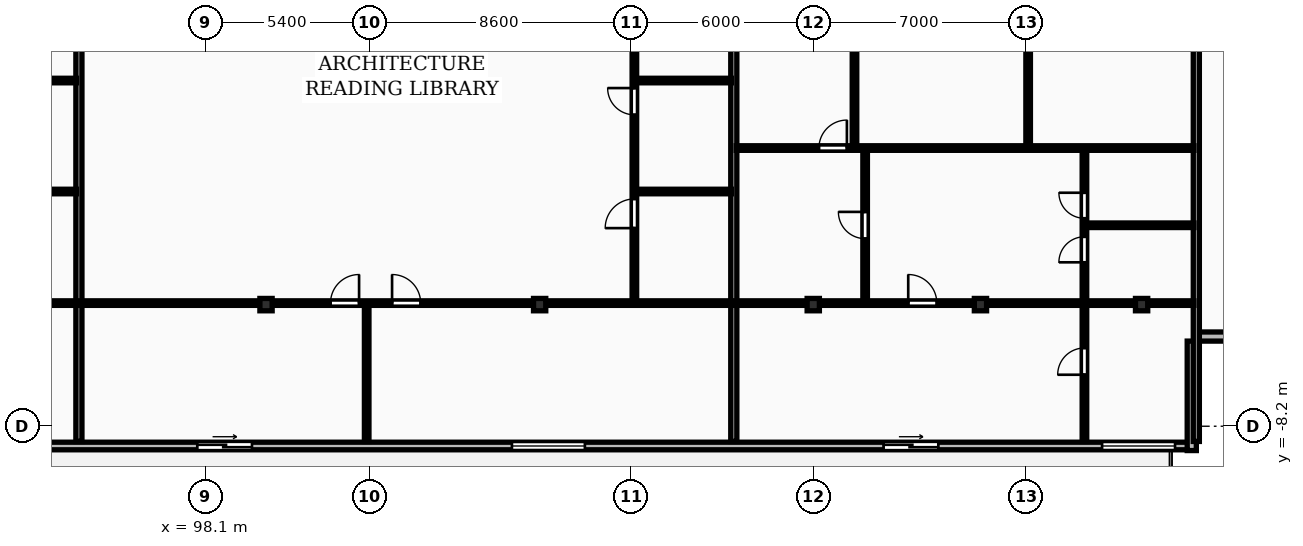
"""IFC4 building model, lengths in metres.
Left out: names, types, materials, properties, quantities, classifications, styles, units other than length and angle.
Written with IfcOpenShell. Run it as: python <this file> out.ifc"""

import sys

from ifc_helpers import new_model, si_unit, direction, frame, frame_2d, origin, origin_2d, place, context, subcontext, project, spatial, rectangle, i_section, extrude, element, fill, save


model = new_model("IFC4")
c1 = context("Model", 3, precision=1e-05, world=origin(), true_north=direction((0.0, 1.0)))
c2 = subcontext(c1, "Body", "Model", "MODEL_VIEW")
j1 = project(units=[si_unit("LENGTHUNIT", "METRE"), si_unit("PLANEANGLEUNIT", "RADIAN")], contexts=[c1])
p1 = place(None, origin())
s1 = spatial("IfcSite", under=j1, at=p1, CompositionType="ELEMENT")
p2 = place(p1, origin())
s2 = spatial("IfcBuilding", under=s1, at=p2, CompositionType="ELEMENT")
p3 = place(p2, frame((0.0, 0.0, 150.1)))
s3 = spatial("IfcBuildingStorey", under=s2, at=p3, CompositionType="ELEMENT", Elevation=150.1)
for number, where, z_axis, x_axis in (
    (1, (100.1, -4.2, 0.0), (0.0, 0.0, 1.0), (1.0, 0.0, 0.0)),
    (2, (109.1, -4.2, 0.0), (0.0, 0.0, 1.0), (1.0, 0.0, 0.0)),
    (3, (118.1, -4.2, 0.0), (0.0, 0.0, 1.0), (1.0, 0.0, 0.0)),
    (4, (123.6, -4.2, 0.0), (0.0, 0.0, 1.0), (1.0, 0.0, 0.0)),
    (5, (128.9, -4.2, 0.0), (0.0, 0.0, 1.0), (1.0, 0.0, 0.0)),
):
    element("IfcColumn", number, at=place(p3, frame(where, z_axis=z_axis, x_axis=x_axis)), inside=s3, PredefinedType="COLUMN", context=c2, shape_type="SweptSolid", body=[
        extrude(i_section(OverallWidth=0.403, OverallDepth=0.406, WebThickness=0.027, FlangeThickness=0.043, FilletRadius=0.015, at=origin_2d()), origin(), (0.0, 0.0, 1.0), 3.6),
    ])
p4 = place(p3, frame((72.7, -8.85, 0.0), z_axis=(0.0, 0.0, 1.0), x_axis=(1.0, 0.0, 0.0)))
e6 = element("IfcWall", 6, at=p4, inside=s3, PredefinedType="STANDARD", context=c2, shape_type="SweptSolid", body=[
    extrude(rectangle(XDim=58.0, YDim=0.25, at=frame_2d((29.0, 0.0))), origin(), (0.0, 0.0, 1.0), 3.31),
])
p5 = place(p4, frame((3.761, 0.0, 0.0)))
e7 = element("IfcOpeningElement", 7, at=p5, cuts=e6, PredefinedType="OPENING", context=c2, shape_type="SweptSolid", body=[
    extrude(rectangle(XDim=1.8, YDim=2.2, at=frame_2d((0.9, 1.1))), frame((0.0, 0.135, 0.0), z_axis=(0.0, -1.0, 0.0), x_axis=(1.0, 0.0, 0.0)), (0.0, 0.0, 1.0), 0.27),
])
p6 = place(p4, frame((13.964, 0.0, 0.85)))
e8 = element("IfcOpeningElement", 8, at=p6, cuts=e6, PredefinedType="OPENING", context=c2, shape_type="SweptSolid", body=[
    extrude(rectangle(XDim=2.4, YDim=1.9, at=frame_2d((1.2, 0.95))), frame((0.0, 0.135, 0.0), z_axis=(0.0, -1.0, 0.0), x_axis=(1.0, 0.0, 0.0)), (0.0, 0.0, 1.0), 0.27),
])
p7 = place(p4, frame((25.138, 0.0, 0.0)))
e9 = element("IfcOpeningElement", 9, at=p7, cuts=e6, PredefinedType="OPENING", context=c2, shape_type="SweptSolid", body=[
    extrude(rectangle(XDim=1.8, YDim=2.2, at=frame_2d((0.9, 1.1))), frame((0.0, 0.135, 0.0), z_axis=(0.0, -1.0, 0.0), x_axis=(1.0, 0.0, 0.0)), (0.0, 0.0, 1.0), 0.27),
])
p8 = place(p4, frame((35.489, 0.0, 0.85)))
e10 = element("IfcOpeningElement", 10, at=p8, cuts=e6, PredefinedType="OPENING", context=c2, shape_type="SweptSolid", body=[
    extrude(rectangle(XDim=2.4, YDim=1.9, at=frame_2d((1.2, 0.95))), frame((0.0, 0.135, 0.0), z_axis=(0.0, -1.0, 0.0), x_axis=(1.0, 0.0, 0.0)), (0.0, 0.0, 1.0), 0.27),
])
p9 = place(p4, frame((47.713, 0.0, 0.0)))
e11 = element("IfcOpeningElement", 11, at=p9, cuts=e6, PredefinedType="OPENING", context=c2, shape_type="SweptSolid", body=[
    extrude(rectangle(XDim=1.8, YDim=2.2, at=frame_2d((0.9, 1.1))), frame((0.0, 0.135, 0.0), z_axis=(0.0, -1.0, 0.0), x_axis=(1.0, 0.0, 0.0)), (0.0, 0.0, 1.0), 0.27),
])
p10 = place(p4, frame((54.9, 0.0, 0.85)))
e12 = element("IfcOpeningElement", 12, at=p10, cuts=e6, PredefinedType="OPENING", context=c2, shape_type="SweptSolid", body=[
    extrude(rectangle(XDim=2.4, YDim=1.9, at=frame_2d((1.2, 0.95))), frame((0.0, 0.135, 0.0), z_axis=(0.0, -1.0, 0.0), x_axis=(1.0, 0.0, 0.0)), (0.0, 0.0, 1.0), 0.27),
])
for number, where, z_axis, x_axis in (
    (13, (130.55, -9.0, 0.0), (0.0, 0.0, 1.0), (0.0, 1.0, 0.0)),
    (14, (130.7, -5.25, 0.0), (0.0, 0.0, 1.0), (1.0, 0.0, 0.0)),
):
    element("IfcWall", number, at=place(p3, frame(where, z_axis=z_axis, x_axis=x_axis)), inside=s3, PredefinedType="STANDARD", context=c2, shape_type="SweptSolid", body=[
        extrude(rectangle(XDim=3.6, YDim=0.3, at=frame_2d((1.8, 0.0))), origin(), (0.0, 0.0, 1.0), 3.31),
    ])
for number, where, z_axis, x_axis in (
    (15, (130.7, -8.7, 0.0), (0.0, 0.0, 1.0), (0.0, 1.0, 0.0)),
    (16, (93.946, -8.7, 0.0), (0.0, 0.0, 1.0), (0.0, 1.0, 0.0)),
):
    element("IfcWall", number, at=place(p3, frame(where, z_axis=z_axis, x_axis=x_axis)), inside=s3, PredefinedType="PARTITIONING", context=c2, shape_type="SweptSolid", body=[
        extrude(rectangle(XDim=24.57, YDim=0.2, at=frame_2d((12.285, 0.0))), origin(), (0.0, 0.0, 1.0), 3.31),
    ])
for number, where, z_axis, x_axis in (
    (17, (90.506, -0.48, 0.0), (0.0, 0.0, 1.0), (1.0, 0.0, 0.0)),
    (18, (90.506, 3.17, 0.0), (0.0, 0.0, 1.0), (1.0, 0.0, 0.0)),
):
    element("IfcWall", number, at=place(p3, frame(where, z_axis=z_axis, x_axis=x_axis)), inside=s3, PredefinedType="PARTITIONING", context=c2, shape_type="SweptSolid", body=[
        extrude(rectangle(XDim=3.36, YDim=0.15, at=frame_2d((1.68, 0.0))), origin(), (0.0, 0.0, 1.0), 3.31),
    ])
p11 = place(p3, frame((72.78, -4.15, 0.0), z_axis=(0.0, 0.0, 1.0), x_axis=(1.0, 0.0, 0.0)))
e19 = element("IfcWall", 19, at=p11, inside=s3, PredefinedType="PARTITIONING", context=c2, shape_type="SweptSolid", body=[
    extrude(rectangle(XDim=21.085, YDim=0.15, at=frame_2d((10.543, 0.0))), origin(), (0.0, 0.0, 1.0), 3.003),
])
p12 = place(p11, frame((6.874, 0.0, 0.0)))
e20 = element("IfcOpeningElement", 20, at=p12, cuts=e19, PredefinedType="OPENING", context=c2, shape_type="SweptSolid", body=[
    extrude(rectangle(XDim=0.92, YDim=2.08, at=frame_2d((0.46, 1.04))), frame((0.0, 0.085, 0.0), z_axis=(0.0, -1.0, 0.0), x_axis=(1.0, 0.0, 0.0)), (0.0, 0.0, 1.0), 0.17),
])
p13 = place(p11, frame((10.797, 0.0, 0.0)))
e21 = element("IfcOpeningElement", 21, at=p13, cuts=e19, PredefinedType="OPENING", context=c2, shape_type="SweptSolid", body=[
    extrude(rectangle(XDim=0.92, YDim=2.08, at=frame_2d((0.46, 1.04))), frame((0.0, 0.085, 0.0), z_axis=(0.0, -1.0, 0.0), x_axis=(1.0, 0.0, 0.0)), (0.0, 0.0, 1.0), 0.17),
])
p14 = place(p3, frame((115.486, -8.7, 0.0), z_axis=(0.0, 0.0, 1.0), x_axis=(0.0, 1.0, 0.0)))
e22 = element("IfcWall", 22, at=p14, inside=s3, PredefinedType="PARTITIONING", context=c2, shape_type="SweptSolid", body=[
    extrude(rectangle(XDim=24.57, YDim=0.2, at=frame_2d((12.285, 0.0))), origin(), (0.0, 0.0, 1.0), 3.31),
])
for number, where, z_axis, x_axis in (
    (23, (112.276, -0.48, 0.0), (0.0, 0.0, 1.0), (1.0, 0.0, 0.0)),
    (24, (112.276, 3.17, 0.0), (0.0, 0.0, 1.0), (1.0, 0.0, 0.0)),
):
    element("IfcWall", number, at=place(p3, frame(where, z_axis=z_axis, x_axis=x_axis)), inside=s3, PredefinedType="PARTITIONING", context=c2, shape_type="SweptSolid", body=[
        extrude(rectangle(XDim=3.13, YDim=0.15, at=frame_2d((1.565, 0.0))), origin(), (0.0, 0.0, 1.0), 3.31),
    ])
p15 = place(p3, frame((112.216, -4.09, 0.0), z_axis=(0.0, 0.0, 1.0), x_axis=(0.0, 1.0, 0.0)))
e25 = element("IfcWall", 25, at=p15, inside=s3, PredefinedType="PARTITIONING", context=c2, shape_type="SweptSolid", body=[
    extrude(rectangle(XDim=19.98, YDim=0.15, at=frame_2d((9.99, 0.0))), origin(), (0.0, 0.0, 1.0), 3.31),
])
p16 = place(p15, frame((2.406, 0.0, 0.0)))
e26 = element("IfcOpeningElement", 26, at=p16, cuts=e25, PredefinedType="OPENING", context=c2, shape_type="SweptSolid", body=[
    extrude(rectangle(XDim=0.96, YDim=2.1, at=frame_2d((0.48, 1.05))), frame((0.0, 0.085, 0.0), z_axis=(0.0, -1.0, 0.0), x_axis=(1.0, 0.0, 0.0)), (0.0, 0.0, 1.0), 0.17),
])
p17 = place(p15, frame((6.133, 0.0, 0.0)))
e27 = element("IfcOpeningElement", 27, at=p17, cuts=e25, PredefinedType="OPENING", context=c2, shape_type="SweptSolid", body=[
    extrude(rectangle(XDim=0.88, YDim=2.06, at=frame_2d((0.44, 1.03))), frame((0.0, 0.085, 0.0), z_axis=(0.0, -1.0, 0.0), x_axis=(1.0, 0.0, 0.0)), (0.0, 0.0, 1.0), 0.17),
])
p18 = place(p15, frame((9.57, 0.0, 0.0)))
e28 = element("IfcOpeningElement", 28, at=p18, cuts=e25, PredefinedType="OPENING", context=c2, shape_type="SweptSolid", body=[
    extrude(rectangle(XDim=0.84, YDim=2.04, at=frame_2d((0.42, 1.02))), frame((0.0, 0.085, 0.0), z_axis=(0.0, -1.0, 0.0), x_axis=(1.0, 0.0, 0.0)), (0.0, 0.0, 1.0), 0.17),
])
p19 = place(p3, frame((103.411, -8.7, 0.0), z_axis=(0.0, 0.0, 1.0), x_axis=(0.0, 1.0, 0.0)))
e29 = element("IfcWall", 29, at=p19, inside=s3, PredefinedType="PARTITIONING", context=c2, shape_type="SweptSolid", body=[
    extrude(rectangle(XDim=4.47, YDim=0.15, at=frame_2d((2.235, 0.0))), origin(), (0.0, 0.0, 1.0), 3.31),
])
p20 = place(p3, frame((94.025, -4.15, 0.0), z_axis=(0.0, 0.0, 1.0), x_axis=(1.0, 0.0, 0.0)))
e30 = element("IfcWall", 30, at=p20, inside=s3, PredefinedType="PARTITIONING", context=c2, shape_type="SweptSolid", body=[
    extrude(rectangle(XDim=21.381, YDim=0.15, at=frame_2d((10.69, 0.0))), origin(), (0.0, 0.0, 1.0), 3.003),
])
p21 = place(p20, frame((8.195, 0.0, 0.0)))
e31 = element("IfcOpeningElement", 31, at=p21, cuts=e30, PredefinedType="OPENING", context=c2, shape_type="SweptSolid", body=[
    extrude(rectangle(XDim=0.94, YDim=2.1, at=frame_2d((0.47, 1.05))), frame((0.0, 0.085, 0.0), z_axis=(0.0, -1.0, 0.0), x_axis=(1.0, 0.0, 0.0)), (0.0, 0.0, 1.0), 0.17),
])
p22 = place(p20, frame((10.22, 0.0, 0.0)))
e32 = element("IfcOpeningElement", 32, at=p22, cuts=e30, PredefinedType="OPENING", context=c2, shape_type="SweptSolid", body=[
    extrude(rectangle(XDim=0.94, YDim=2.1, at=frame_2d((0.47, 1.05))), frame((0.0, 0.085, 0.0), z_axis=(0.0, -1.0, 0.0), x_axis=(1.0, 0.0, 0.0)), (0.0, 0.0, 1.0), 0.17),
])
p23 = place(p3, frame((125.168, 0.99, 0.0), z_axis=(0.0, 0.0, 1.0), x_axis=(0.0, 1.0, 0.0)))
e33 = element("IfcWall", 33, at=p23, inside=s3, PredefinedType="PARTITIONING", context=c2, shape_type="SweptSolid", body=[
    extrude(rectangle(XDim=14.9, YDim=0.15, at=frame_2d((7.45, 0.0))), origin(), (0.0, 0.0, 1.0), 3.31),
])
p24 = place(p23, frame((3.498, 0.0, 0.0)))
e34 = element("IfcOpeningElement", 34, at=p24, cuts=e33, PredefinedType="OPENING", context=c2, shape_type="SweptSolid", body=[
    extrude(rectangle(XDim=0.84, YDim=2.04, at=frame_2d((0.42, 1.02))), frame((0.0, 0.085, 0.0), z_axis=(0.0, -1.0, 0.0), x_axis=(1.0, 0.0, 0.0)), (0.0, 0.0, 1.0), 0.17),
])
p25 = place(p23, frame((7.52, 0.0, 0.0)))
e35 = element("IfcOpeningElement", 35, at=p25, cuts=e33, PredefinedType="OPENING", context=c2, shape_type="SweptSolid", body=[
    extrude(rectangle(XDim=0.88, YDim=2.06, at=frame_2d((0.44, 1.03))), frame((0.0, 0.085, 0.0), z_axis=(0.0, -1.0, 0.0), x_axis=(1.0, 0.0, 0.0)), (0.0, 0.0, 1.0), 0.17),
])
p26 = place(p3, frame((119.456, 0.99, 0.0), z_axis=(0.0, 0.0, 1.0), x_axis=(0.0, 1.0, 0.0)))
e36 = element("IfcWall", 36, at=p26, inside=s3, PredefinedType="PARTITIONING", context=c2, shape_type="SweptSolid", body=[
    extrude(rectangle(XDim=14.9, YDim=0.15, at=frame_2d((7.45, 0.0))), origin(), (0.0, 0.0, 1.0), 3.31),
])
p27 = place(p26, frame((3.477, 0.0, 0.0)))
e37 = element("IfcOpeningElement", 37, at=p27, cuts=e36, PredefinedType="OPENING", context=c2, shape_type="SweptSolid", body=[
    extrude(rectangle(XDim=0.88, YDim=2.06, at=frame_2d((0.44, 1.03))), frame((0.0, 0.085, 0.0), z_axis=(0.0, -1.0, 0.0), x_axis=(1.0, 0.0, 0.0)), (0.0, 0.0, 1.0), 0.17),
])
p28 = place(p3, frame((119.806, -4.09, 0.0), z_axis=(0.0, 0.0, 1.0), x_axis=(0.0, 1.0, 0.0)))
e38 = element("IfcWall", 38, at=p28, inside=s3, PredefinedType="PARTITIONING", context=c2, shape_type="SweptSolid", body=[
    extrude(rectangle(XDim=5.0, YDim=0.15, at=frame_2d((2.5, 0.0))), origin(), (0.0, 0.0, 1.0), 3.31),
])
p29 = place(p28, frame((2.06, 0.0, 0.0)))
e39 = element("IfcOpeningElement", 39, at=p29, cuts=e38, PredefinedType="OPENING", context=c2, shape_type="SweptSolid", body=[
    extrude(rectangle(XDim=0.88, YDim=2.06, at=frame_2d((0.44, 1.03))), frame((0.0, 0.085, 0.0), z_axis=(0.0, -1.0, 0.0), x_axis=(1.0, 0.0, 0.0)), (0.0, 0.0, 1.0), 0.17),
])
p30 = place(p3, frame((127.08, -1.59, 0.0), z_axis=(0.0, 0.0, 1.0), x_axis=(1.0, 0.0, 0.0)))
e40 = element("IfcWall", 40, at=p30, inside=s3, PredefinedType="PARTITIONING", context=c2, shape_type="SweptSolid", body=[
    extrude(rectangle(XDim=3.54, YDim=0.15, at=frame_2d((1.77, 0.0))), origin(), (0.0, 0.0, 1.0), 3.31),
])
p31 = place(p3, frame((127.02, -8.7, 0.0), z_axis=(0.0, 0.0, 1.0), x_axis=(0.0, 1.0, 0.0)))
e41 = element("IfcWall", 41, at=p31, inside=s3, PredefinedType="PARTITIONING", context=c2, shape_type="SweptSolid", body=[
    extrude(rectangle(XDim=9.61, YDim=0.15, at=frame_2d((4.805, 0.0))), origin(), (0.0, 0.0, 1.0), 3.31),
])
p32 = place(p31, frame((5.892, 0.0, 0.0)))
e42 = element("IfcOpeningElement", 42, at=p32, cuts=e41, PredefinedType="OPENING", context=c2, shape_type="SweptSolid", body=[
    extrude(rectangle(XDim=0.84, YDim=2.04, at=frame_2d((0.42, 1.02))), frame((0.0, 0.085, 0.0), z_axis=(0.0, -1.0, 0.0), x_axis=(1.0, 0.0, 0.0)), (0.0, 0.0, 1.0), 0.17),
])
p33 = place(p31, frame((7.34, 0.0, 0.0)))
e43 = element("IfcOpeningElement", 43, at=p33, cuts=e41, PredefinedType="OPENING", context=c2, shape_type="SweptSolid", body=[
    extrude(rectangle(XDim=0.84, YDim=2.04, at=frame_2d((0.42, 1.02))), frame((0.0, 0.085, 0.0), z_axis=(0.0, -1.0, 0.0), x_axis=(1.0, 0.0, 0.0)), (0.0, 0.0, 1.0), 0.17),
])
p34 = place(p31, frame((2.194, 0.0, 0.0)))
e44 = element("IfcOpeningElement", 44, at=p34, cuts=e41, PredefinedType="OPENING", context=c2, shape_type="SweptSolid", body=[
    extrude(rectangle(XDim=0.88, YDim=2.06, at=frame_2d((0.44, 1.03))), frame((0.0, 0.085, 0.0), z_axis=(0.0, -1.0, 0.0), x_axis=(1.0, 0.0, 0.0)), (0.0, 0.0, 1.0), 0.17),
])
p35 = place(p3, frame((115.566, 0.95, 0.0), z_axis=(0.0, 0.0, 1.0), x_axis=(1.0, 0.0, 0.0)))
e45 = element("IfcWall", 45, at=p35, inside=s3, PredefinedType="PARTITIONING", context=c2, shape_type="SweptSolid", body=[
    extrude(rectangle(XDim=15.054, YDim=0.15, at=frame_2d((7.527, 0.0))), origin(), (0.0, 0.0, 1.0), 3.31),
])
p36 = place(p35, frame((2.72, 0.0, 0.0)))
e46 = element("IfcOpeningElement", 46, at=p36, cuts=e45, PredefinedType="OPENING", context=c2, shape_type="SweptSolid", body=[
    extrude(rectangle(XDim=0.92, YDim=2.08, at=frame_2d((0.46, 1.04))), frame((0.0, 0.085, 0.0), z_axis=(0.0, -1.0, 0.0), x_axis=(1.0, 0.0, 0.0)), (0.0, 0.0, 1.0), 0.17),
])
p37 = place(p3, frame((115.566, -4.15, 0.0), z_axis=(0.0, 0.0, 1.0), x_axis=(1.0, 0.0, 0.0)))
e47 = element("IfcWall", 47, at=p37, inside=s3, PredefinedType="PARTITIONING", context=c2, shape_type="SweptSolid", body=[
    extrude(rectangle(XDim=15.054, YDim=0.15, at=frame_2d((7.527, 0.0))), origin(), (0.0, 0.0, 1.0), 3.003),
])
p38 = place(p37, frame((5.657, 0.0, 0.0)))
e48 = element("IfcOpeningElement", 48, at=p38, cuts=e47, PredefinedType="OPENING", context=c2, shape_type="SweptSolid", body=[
    extrude(rectangle(XDim=0.94, YDim=2.1, at=frame_2d((0.47, 1.05))), frame((0.0, 0.085, 0.0), z_axis=(0.0, -1.0, 0.0), x_axis=(1.0, 0.0, 0.0)), (0.0, 0.0, 1.0), 0.17),
])
p39 = place(p7, origin())
e49 = element("IfcDoor", 49, at=p39, inside=s3, OperationType="SLIDING_TO_RIGHT", PredefinedType="DOOR", context=c2, shape_type="SweptSolid", body=[
    extrude(rectangle(XDim=1.8, YDim=2.2, at=frame_2d((0.9, 1.1))), frame((0.0, 0.025, 0.0), z_axis=(0.0, -1.0, 0.0), x_axis=(1.0, 0.0, 0.0)), (0.0, 0.0, 1.0), 0.05),
])
fill(e9, e49)
p40 = place(p8, origin())
e50 = element("IfcWindow", 50, at=p40, inside=s3, PartitioningType="DOUBLE_PANEL_VERTICAL", PredefinedType="WINDOW", context=c2, shape_type="SweptSolid", body=[
    extrude(rectangle(XDim=2.4, YDim=1.9, at=frame_2d((1.2, 0.95))), frame((0.0, 0.03, 0.0), z_axis=(0.0, -1.0, 0.0), x_axis=(1.0, 0.0, 0.0)), (0.0, 0.0, 1.0), 0.06),
])
fill(e10, e50)
p41 = place(p9, origin())
e51 = element("IfcDoor", 51, at=p41, inside=s3, OperationType="SLIDING_TO_RIGHT", PredefinedType="DOOR", context=c2, shape_type="SweptSolid", body=[
    extrude(rectangle(XDim=1.8, YDim=2.2, at=frame_2d((0.9, 1.1))), frame((0.0, 0.025, 0.0), z_axis=(0.0, -1.0, 0.0), x_axis=(1.0, 0.0, 0.0)), (0.0, 0.0, 1.0), 0.05),
])
fill(e11, e51)
p42 = place(p10, origin())
e52 = element("IfcWindow", 52, at=p42, inside=s3, PartitioningType="DOUBLE_PANEL_VERTICAL", PredefinedType="WINDOW", context=c2, shape_type="SweptSolid", body=[
    extrude(rectangle(XDim=2.4, YDim=1.9, at=frame_2d((1.2, 0.95))), frame((0.0, 0.03, 0.0), z_axis=(0.0, -1.0, 0.0), x_axis=(1.0, 0.0, 0.0)), (0.0, 0.0, 1.0), 0.06),
])
fill(e12, e52)
p43 = place(p16, origin())
e53 = element("IfcDoor", 53, at=p43, inside=s3, OperationType="SINGLE_SWING_LEFT", PredefinedType="DOOR", context=c2, shape_type="SweptSolid", body=[
    extrude(rectangle(XDim=0.96, YDim=2.1, at=frame_2d((0.48, 1.05))), frame((0.0, 0.025, 0.0), z_axis=(0.0, -1.0, 0.0), x_axis=(1.0, 0.0, 0.0)), (0.0, 0.0, 1.0), 0.05),
])
fill(e26, e53)
p44 = place(p17, origin())
e54 = element("IfcDoor", 54, at=p44, inside=s3, OperationType="SINGLE_SWING_RIGHT", PredefinedType="DOOR", context=c2, shape_type="SweptSolid", body=[
    extrude(rectangle(XDim=0.88, YDim=2.06, at=frame_2d((0.44, 1.03))), frame((0.0, 0.025, 0.0), z_axis=(0.0, -1.0, 0.0), x_axis=(1.0, 0.0, 0.0)), (0.0, 0.0, 1.0), 0.05),
])
fill(e27, e54)
p45 = place(p21, origin())
e55 = element("IfcDoor", 55, at=p45, inside=s3, OperationType="SINGLE_SWING_RIGHT", PredefinedType="DOOR", context=c2, shape_type="SweptSolid", body=[
    extrude(rectangle(XDim=0.94, YDim=2.1, at=frame_2d((0.47, 1.05))), frame((0.0, 0.025, 0.0), z_axis=(0.0, -1.0, 0.0), x_axis=(1.0, 0.0, 0.0)), (0.0, 0.0, 1.0), 0.05),
])
fill(e31, e55)
p46 = place(p22, origin())
e56 = element("IfcDoor", 56, at=p46, inside=s3, OperationType="SINGLE_SWING_LEFT", PredefinedType="DOOR", context=c2, shape_type="SweptSolid", body=[
    extrude(rectangle(XDim=0.94, YDim=2.1, at=frame_2d((0.47, 1.05))), frame((0.0, 0.025, 0.0), z_axis=(0.0, -1.0, 0.0), x_axis=(1.0, 0.0, 0.0)), (0.0, 0.0, 1.0), 0.05),
])
fill(e32, e56)
p47 = place(p29, origin())
e57 = element("IfcDoor", 57, at=p47, inside=s3, OperationType="SINGLE_SWING_RIGHT", PredefinedType="DOOR", context=c2, shape_type="SweptSolid", body=[
    extrude(rectangle(XDim=0.88, YDim=2.06, at=frame_2d((0.44, 1.03))), frame((0.0, 0.025, 0.0), z_axis=(0.0, -1.0, 0.0), x_axis=(1.0, 0.0, 0.0)), (0.0, 0.0, 1.0), 0.05),
])
fill(e39, e57)
p48 = place(p32, origin())
e58 = element("IfcDoor", 58, at=p48, inside=s3, OperationType="SINGLE_SWING_LEFT", PredefinedType="DOOR", context=c2, shape_type="SweptSolid", body=[
    extrude(rectangle(XDim=0.84, YDim=2.04, at=frame_2d((0.42, 1.02))), frame((0.0, 0.025, 0.0), z_axis=(0.0, -1.0, 0.0), x_axis=(1.0, 0.0, 0.0)), (0.0, 0.0, 1.0), 0.05),
])
fill(e42, e58)
p49 = place(p33, origin())
e59 = element("IfcDoor", 59, at=p49, inside=s3, OperationType="SINGLE_SWING_RIGHT", PredefinedType="DOOR", context=c2, shape_type="SweptSolid", body=[
    extrude(rectangle(XDim=0.84, YDim=2.04, at=frame_2d((0.42, 1.02))), frame((0.0, 0.025, 0.0), z_axis=(0.0, -1.0, 0.0), x_axis=(1.0, 0.0, 0.0)), (0.0, 0.0, 1.0), 0.05),
])
fill(e43, e59)
p50 = place(p34, origin())
e60 = element("IfcDoor", 60, at=p50, inside=s3, OperationType="SINGLE_SWING_LEFT", PredefinedType="DOOR", context=c2, shape_type="SweptSolid", body=[
    extrude(rectangle(XDim=0.88, YDim=2.06, at=frame_2d((0.44, 1.03))), frame((0.0, 0.025, 0.0), z_axis=(0.0, -1.0, 0.0), x_axis=(1.0, 0.0, 0.0)), (0.0, 0.0, 1.0), 0.05),
])
fill(e44, e60)
p51 = place(p36, origin())
e61 = element("IfcDoor", 61, at=p51, inside=s3, OperationType="SINGLE_SWING_RIGHT", PredefinedType="DOOR", context=c2, shape_type="SweptSolid", body=[
    extrude(rectangle(XDim=0.92, YDim=2.08, at=frame_2d((0.46, 1.04))), frame((0.0, 0.025, 0.0), z_axis=(0.0, -1.0, 0.0), x_axis=(1.0, 0.0, 0.0)), (0.0, 0.0, 1.0), 0.05),
])
fill(e46, e61)
p52 = place(p38, origin())
e62 = element("IfcDoor", 62, at=p52, inside=s3, OperationType="SINGLE_SWING_LEFT", PredefinedType="DOOR", context=c2, shape_type="SweptSolid", body=[
    extrude(rectangle(XDim=0.94, YDim=2.1, at=frame_2d((0.47, 1.05))), frame((0.0, 0.025, 0.0), z_axis=(0.0, -1.0, 0.0), x_axis=(1.0, 0.0, 0.0)), (0.0, 0.0, 1.0), 0.05),
])
fill(e48, e62)
save(model, sys.argv[1])
